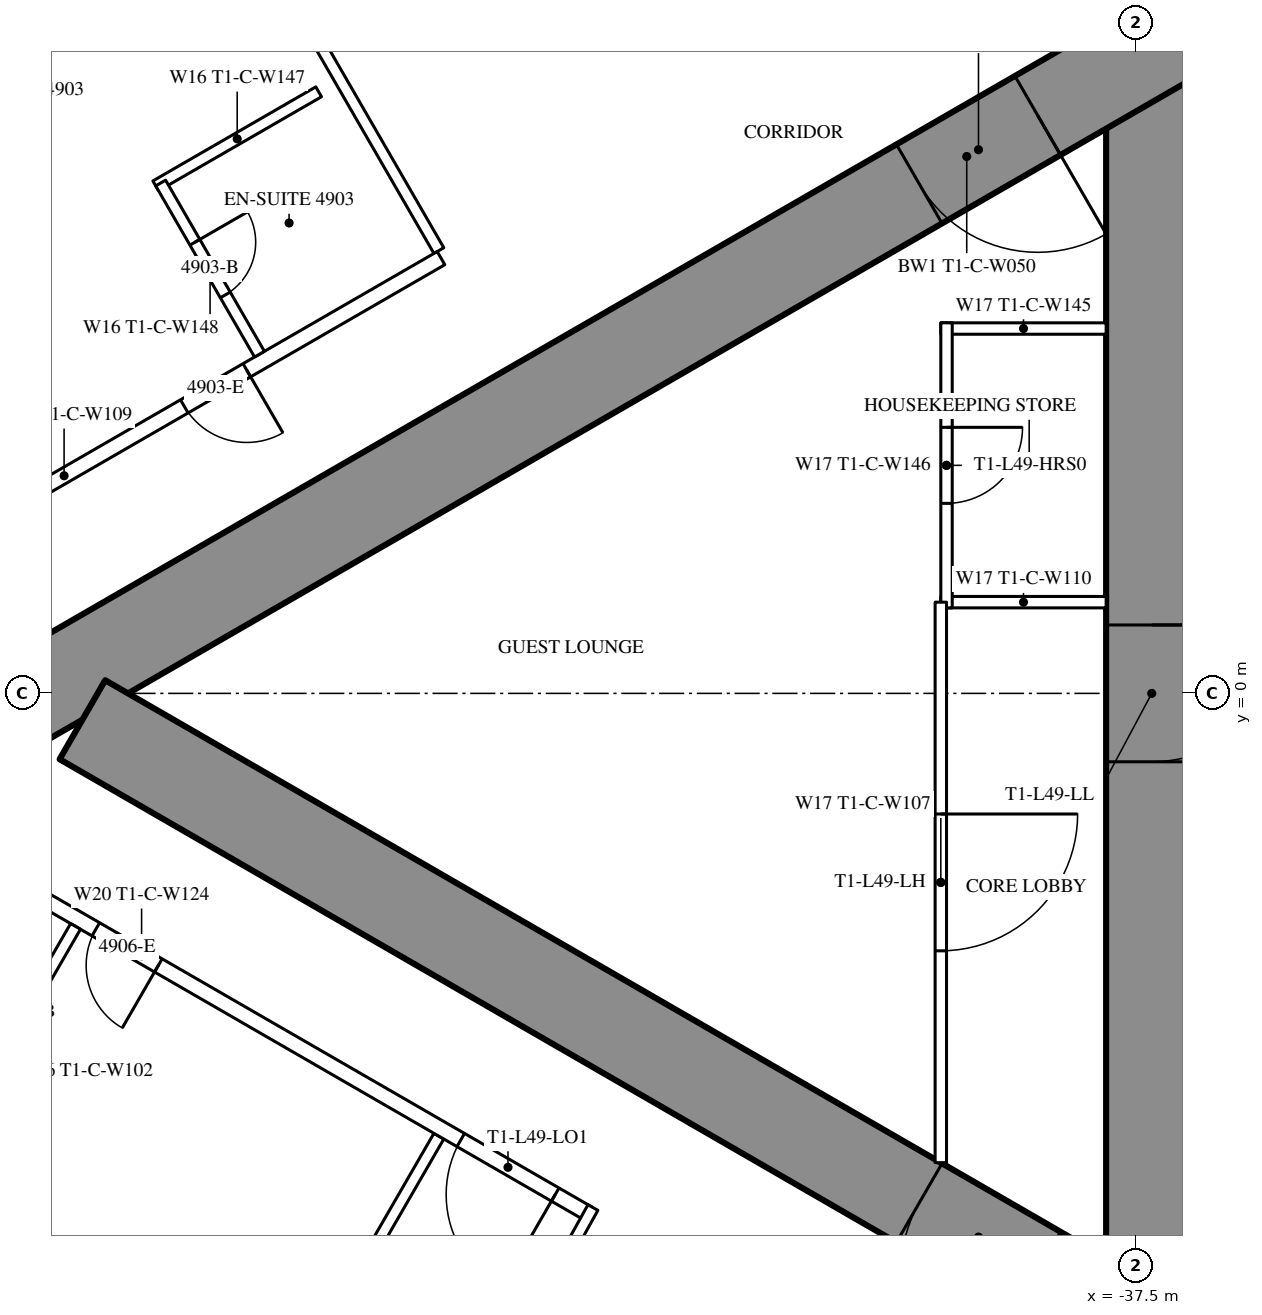
"""IFC4 building model, lengths in metres.
Left out: names, types, materials, properties, quantities, classifications, styles, units other than length and angle.
Written with IfcOpenShell. Run it as: python <this file> out.ifc"""

import sys

from ifc_helpers import new_model, si_unit, direction, frame, frame_2d, origin, place, context, subcontext, project, spatial, rectangle, extrude, element, fill, save


model = new_model("IFC4")
c1 = context("Model", 3, precision=1e-05, world=origin(), true_north=direction((0.0, 1.0)))
c2 = subcontext(c1, "Body", "Model", "MODEL_VIEW")
j1 = project(units=[si_unit("LENGTHUNIT", "METRE"), si_unit("PLANEANGLEUNIT", "RADIAN")], contexts=[c1])
p1 = place(None, origin())
s1 = spatial("IfcSite", under=j1, at=p1, CompositionType="ELEMENT")
p2 = place(p1, origin())
s2 = spatial("IfcBuilding", under=s1, at=p2, CompositionType="ELEMENT")
p3 = place(p2, frame((0.0, 0.0, 184.3)))
s3 = spatial("IfcBuildingStorey", under=s2, at=p3, CompositionType="ELEMENT", Elevation=184.3)
p4 = place(p3, frame((-37.3, 8.6, 0.0), z_axis=(0.0, 0.0, 1.0), x_axis=(0.0, -1.0, 0.0)))
e1 = element("IfcWall", 1, at=p4, inside=s3, PredefinedType="SHEAR", context=c2, shape_type="SweptSolid", body=[
    extrude(rectangle(XDim=17.2, YDim=1.2, at=frame_2d((8.6, 0.0))), origin(), (0.0, 0.0, 1.0), 3.5),
])
p5 = place(p4, frame((7.7, 0.0, 0.0)))
e2 = element("IfcOpeningElement", 2, at=p5, cuts=e1, PredefinedType="OPENING", context=c2, shape_type="SweptSolid", body=[
    extrude(rectangle(XDim=1.8, YDim=2.2, at=frame_2d((0.9, 1.1))), frame((0.0, 0.61, 0.0), z_axis=(0.0, -1.0, 0.0), x_axis=(1.0, 0.0, 0.0)), (0.0, 0.0, 1.0), 1.22),
])
p6 = place(p3, frame((-27.2, 14.3, 0.0), z_axis=(0.0, 0.0, 1.0), x_axis=(-0.866026593062, -0.499997940104, 0.0)))
e3 = element("IfcWall", 3, at=p6, inside=s3, PredefinedType="SHEAR", context=c2, shape_type="SweptSolid", body=[
    extrude(rectangle(XDim=28.946, YDim=1.2, at=frame_2d((14.473, 0.0))), origin(), (0.0, 0.0, 1.0), 3.5),
])
p7 = place(p6, frame((4.6, 0.0, 0.0)))
e4 = element("IfcOpeningElement", 4, at=p7, cuts=e3, PredefinedType="OPENING", context=c2, shape_type="SweptSolid", body=[
    extrude(rectangle(XDim=1.0, YDim=2.2, at=frame_2d((0.5, 1.1))), frame((0.0, 0.61, 0.0), z_axis=(0.0, -1.0, 0.0), x_axis=(1.0, 0.0, 0.0)), (0.0, 0.0, 1.0), 1.22),
])
p8 = place(p6, frame((13.395, 0.0, 0.0)))
e5 = element("IfcOpeningElement", 5, at=p8, cuts=e3, PredefinedType="OPENING", context=c2, shape_type="SweptSolid", body=[
    extrude(rectangle(XDim=1.8, YDim=2.2, at=frame_2d((0.9, 1.1))), frame((0.0, 0.61, 0.0), z_axis=(0.0, -1.0, 0.0), x_axis=(1.0, 0.0, 0.0)), (0.0, 0.0, 1.0), 1.22),
])
p9 = place(p3, frame((-27.2, -14.3, 0.0), z_axis=(0.0, 0.0, 1.0), x_axis=(-0.866024021859, 0.500002393557, 0.0)))
e6 = element("IfcWall", 6, at=p9, inside=s3, PredefinedType="SHEAR", context=c2, shape_type="SweptSolid", body=[
    extrude(rectangle(XDim=27.907, YDim=1.2, at=frame_2d((13.954, 0.0))), origin(), (0.0, 0.0, 1.0), 3.5),
])
p10 = place(p9, frame((4.6, 0.0, 0.0)))
e7 = element("IfcOpeningElement", 7, at=p10, cuts=e6, PredefinedType="OPENING", context=c2, shape_type="SweptSolid", body=[
    extrude(rectangle(XDim=1.0, YDim=2.2, at=frame_2d((0.5, 1.1))), frame((0.0, 0.61, 0.0), z_axis=(0.0, -1.0, 0.0), x_axis=(1.0, 0.0, 0.0)), (0.0, 0.0, 1.0), 1.22),
])
p11 = place(p9, frame((13.395, 0.0, 0.0)))
e8 = element("IfcOpeningElement", 8, at=p11, cuts=e6, PredefinedType="OPENING", context=c2, shape_type="SweptSolid", body=[
    extrude(rectangle(XDim=1.8, YDim=2.2, at=frame_2d((0.9, 1.1))), frame((0.0, 0.61, 0.0), z_axis=(0.0, -1.0, 0.0), x_axis=(1.0, 0.0, 0.0)), (0.0, 0.0, 1.0), 1.22),
])
for number, where, z_axis, x_axis in (
    (9, (-46.679, 5.825, 0.0), (0.0, 0.0, 1.0), (-0.5, 0.866, 0.0)),
    (10, (-46.679, -5.825, 0.0), (0.0, 0.0, 1.0), (-0.5, -0.866, 0.0)),
):
    element("IfcWall", number, at=place(p3, frame(where, z_axis=z_axis, x_axis=x_axis)), inside=s3, PredefinedType="PARTITIONING", context=c2, shape_type="SweptSolid", body=[
        extrude(rectangle(XDim=6.911, YDim=0.15, at=frame_2d((3.456, 0.0))), origin(), (0.0, 0.0, 1.0), 2.3),
    ])
p12 = place(p3, frame((-44.715, -6.844, 0.0), z_axis=(0.0, 0.0, 1.0), x_axis=(-0.866025261224, 0.500000246922, 0.0)))
e11 = element("IfcWall", 11, at=p12, inside=s3, PredefinedType="PARTITIONING", context=c2, shape_type="SweptSolid", body=[
    extrude(rectangle(XDim=13.567, YDim=0.2, at=frame_2d((6.783, 0.0))), origin(), (0.0, 0.0, 1.0), 3.25),
])
p13 = place(p12, frame((10.579, 0.0, 0.0)))
e12 = element("IfcOpeningElement", 12, at=p13, cuts=e11, PredefinedType="OPENING", context=c2, shape_type="SweptSolid", body=[
    extrude(rectangle(XDim=0.95, YDim=2.2, at=frame_2d((0.475, 1.1))), frame((0.0, 0.11, 0.0), z_axis=(0.0, -1.0, 0.0), x_axis=(1.0, 0.0, 0.0)), (0.0, 0.0, 1.0), 0.22),
])
p14 = place(p12, frame((6.529, 0.0, 0.0)))
e13 = element("IfcOpeningElement", 13, at=p14, cuts=e11, PredefinedType="OPENING", context=c2, shape_type="SweptSolid", body=[
    extrude(rectangle(XDim=0.95, YDim=2.2, at=frame_2d((0.475, 1.1))), frame((0.0, 0.11, 0.0), z_axis=(0.0, -1.0, 0.0), x_axis=(1.0, 0.0, 0.0)), (0.0, 0.0, 1.0), 0.22),
])
p15 = place(p12, frame((0.5, 0.0, 0.0)))
e14 = element("IfcOpeningElement", 14, at=p15, cuts=e11, PredefinedType="OPENING", context=c2, shape_type="SweptSolid", body=[
    extrude(rectangle(XDim=1.435, YDim=2.2, at=frame_2d((0.718, 1.1))), frame((0.0, 0.11, 0.0), z_axis=(0.0, -1.0, 0.0), x_axis=(1.0, 0.0, 0.0)), (0.0, 0.0, 1.0), 0.22),
])
p16 = place(p3, frame((-44.652, -6.764, 0.0), z_axis=(0.0, 0.0, 1.0), x_axis=(-0.485424724123, -0.874278466629, 0.0)))
e15 = element("IfcWall", 15, at=p16, inside=s3, PredefinedType="PARTITIONING", context=c2, shape_type="SweptSolid", body=[
    extrude(rectangle(XDim=1.805, YDim=0.15, at=frame_2d((0.903, 0.0))), origin(), (0.0, 0.0, 1.0), 3.25),
])
p17 = place(p3, frame((-46.65, 5.726, 0.0), z_axis=(0.0, 0.0, 1.0), x_axis=(-0.866027963864, -0.499995565786, 0.0)))
e16 = element("IfcWall", 16, at=p17, inside=s3, PredefinedType="PARTITIONING", context=c2, shape_type="SweptSolid", body=[
    extrude(rectangle(XDim=11.452, YDim=0.2, at=frame_2d((5.726, 0.0))), origin(), (0.0, 0.0, 1.0), 3.25),
])
p18 = place(p17, frame((2.95, 0.0, 0.0)))
e17 = element("IfcOpeningElement", 17, at=p18, cuts=e16, PredefinedType="OPENING", context=c2, shape_type="SweptSolid", body=[
    extrude(rectangle(XDim=0.95, YDim=2.2, at=frame_2d((0.475, 1.1))), frame((0.0, 0.11, 0.0), z_axis=(0.0, -1.0, 0.0), x_axis=(1.0, 0.0, 0.0)), (0.0, 0.0, 1.0), 0.22),
])
p19 = place(p17, frame((8.344, 0.0, 0.0)))
e18 = element("IfcOpeningElement", 18, at=p19, cuts=e16, PredefinedType="OPENING", context=c2, shape_type="SweptSolid", body=[
    extrude(rectangle(XDim=0.95, YDim=2.2, at=frame_2d((0.475, 1.1))), frame((0.0, 0.11, 0.0), z_axis=(0.0, -1.0, 0.0), x_axis=(1.0, 0.0, 0.0)), (0.0, 0.0, 1.0), 0.22),
])
p20 = place(p3, frame((-48.26, 7.914, 0.0), z_axis=(0.0, 0.0, 1.0), x_axis=(-0.866031185235, -0.4999899861, 0.0)))
e19 = element("IfcWall", 19, at=p20, inside=s3, PredefinedType="PARTITIONING", context=c2, shape_type="SweptSolid", body=[
    extrude(rectangle(XDim=2.475, YDim=0.15, at=frame_2d((1.238, 0.0))), origin(), (0.0, 0.0, 1.0), 3.25),
])
p21 = place(p3, frame((-49.039, 4.463, 0.0), z_axis=(0.0, 0.0, 1.0), x_axis=(-0.499936506574, 0.866062058628, 0.0)))
e20 = element("IfcWall", 20, at=p21, inside=s3, PredefinedType="PARTITIONING", context=c2, shape_type="SweptSolid", body=[
    extrude(rectangle(XDim=2.6, YDim=0.15, at=frame_2d((1.3, 0.0))), origin(), (0.0, 0.0, 1.0), 3.25),
])
p22 = place(p21, frame((0.9, 0.0, 0.0)))
e21 = element("IfcOpeningElement", 21, at=p22, cuts=e20, PredefinedType="OPENING", context=c2, shape_type="SweptSolid", body=[
    extrude(rectangle(XDim=0.8, YDim=2.2, at=frame_2d((0.4, 1.1))), frame((0.0, 0.085, 0.0), z_axis=(0.0, -1.0, 0.0), x_axis=(1.0, 0.0, 0.0)), (0.0, 0.0, 1.0), 0.17),
])
p23 = place(p3, frame((-51.459, -3.065, 0.0), z_axis=(0.0, 0.0, 1.0), x_axis=(-0.499936506574, -0.866062058628, 0.0)))
e22 = element("IfcWall", 22, at=p23, inside=s3, PredefinedType="PARTITIONING", context=c2, shape_type="SweptSolid", body=[
    extrude(rectangle(XDim=2.6, YDim=0.15, at=frame_2d((1.3, 0.0))), origin(), (0.0, 0.0, 1.0), 3.25),
])
p24 = place(p23, frame((0.9, 0.0, 0.0)))
e23 = element("IfcOpeningElement", 23, at=p24, cuts=e22, PredefinedType="OPENING", context=c2, shape_type="SweptSolid", body=[
    extrude(rectangle(XDim=0.8, YDim=2.2, at=frame_2d((0.4, 1.1))), frame((0.0, 0.085, 0.0), z_axis=(0.0, -1.0, 0.0), x_axis=(1.0, 0.0, 0.0)), (0.0, 0.0, 1.0), 0.17),
])
for number, where, z_axis, x_axis in (
    (24, (-37.9, 1.2, 0.0), (0.0, 0.0, 1.0), (-1.0, 0.0, 0.0)),
    (25, (-37.9, 4.8, 0.0), (0.0, 0.0, 1.0), (-1.0, 0.0, 0.0)),
):
    element("IfcWall", number, at=place(p3, frame(where, z_axis=z_axis, x_axis=x_axis)), inside=s3, PredefinedType="PARTITIONING", context=c2, shape_type="SweptSolid", body=[
        extrude(rectangle(XDim=2.175, YDim=0.15, at=frame_2d((1.087, 0.0))), origin(), (0.0, 0.0, 1.0), 3.25),
    ])
p25 = place(p3, frame((-40.0, 4.875, 0.0), z_axis=(0.0, 0.0, 1.0), x_axis=(0.0, -1.0, 0.0)))
e26 = element("IfcWall", 26, at=p25, inside=s3, PredefinedType="PARTITIONING", context=c2, shape_type="SweptSolid", body=[
    extrude(rectangle(XDim=3.75, YDim=0.15, at=frame_2d((1.875, 0.0))), origin(), (0.0, 0.0, 1.0), 3.25),
])
p26 = place(p25, frame((1.375, 0.0, 0.0)))
e27 = element("IfcOpeningElement", 27, at=p26, cuts=e26, PredefinedType="OPENING", context=c2, shape_type="SweptSolid", body=[
    extrude(rectangle(XDim=1.0, YDim=2.2, at=frame_2d((0.5, 1.1))), frame((0.0, 0.085, 0.0), z_axis=(0.0, -1.0, 0.0), x_axis=(1.0, 0.0, 0.0)), (0.0, 0.0, 1.0), 0.17),
])
p27 = place(p3, frame((-40.075, 1.2, 0.0), z_axis=(0.0, 0.0, 1.0), x_axis=(0.0, -1.0, 0.0)))
e28 = element("IfcWall", 28, at=p27, inside=s3, PredefinedType="PARTITIONING", context=c2, shape_type="SweptSolid", body=[
    extrude(rectangle(XDim=7.374, YDim=0.15, at=frame_2d((3.687, 0.0))), origin(), (0.0, 0.0, 1.0), 3.25),
])
p28 = place(p27, frame((2.787, 0.0, 0.0)))
e29 = element("IfcOpeningElement", 29, at=p28, cuts=e28, PredefinedType="OPENING", context=c2, shape_type="SweptSolid", body=[
    extrude(rectangle(XDim=1.8, YDim=2.2, at=frame_2d((0.9, 1.1))), frame((0.0, 0.085, 0.0), z_axis=(0.0, -1.0, 0.0), x_axis=(1.0, 0.0, 0.0)), (0.0, 0.0, 1.0), 0.17),
])
p29 = place(p22, origin())
e30 = element("IfcDoor", 30, at=p29, inside=s3, OperationType="SINGLE_SWING_RIGHT", PredefinedType="DOOR", context=c2, shape_type="SweptSolid", body=[
    extrude(rectangle(XDim=0.8, YDim=2.2, at=frame_2d((0.4, 1.1))), frame((0.0, 0.025, 0.0), z_axis=(0.0, -1.0, 0.0), x_axis=(1.0, 0.0, 0.0)), (0.0, 0.0, 1.0), 0.05),
])
fill(e21, e30)
p30 = place(p18, origin())
e31 = element("IfcDoor", 31, at=p30, inside=s3, OperationType="SINGLE_SWING_LEFT", PredefinedType="DOOR", context=c2, shape_type="SweptSolid", body=[
    extrude(rectangle(XDim=0.95, YDim=2.2, at=frame_2d((0.475, 1.1))), frame((0.0, 0.025, 0.0), z_axis=(0.0, -1.0, 0.0), x_axis=(1.0, 0.0, 0.0)), (0.0, 0.0, 1.0), 0.05),
])
fill(e17, e31)
p31 = place(p14, origin())
e32 = element("IfcDoor", 32, at=p31, inside=s3, OperationType="SINGLE_SWING_LEFT", PredefinedType="DOOR", context=c2, shape_type="SweptSolid", body=[
    extrude(rectangle(XDim=0.95, YDim=2.2, at=frame_2d((0.475, 1.1))), frame((0.0, 0.025, 0.0), z_axis=(0.0, -1.0, 0.0), x_axis=(1.0, 0.0, 0.0)), (0.0, 0.0, 1.0), 0.05),
])
fill(e13, e32)
p32 = place(p15, origin())
e33 = element("IfcDoor", 33, at=p32, inside=s3, OperationType="SINGLE_SWING_LEFT", PredefinedType="DOOR", context=c2, shape_type="SweptSolid", body=[
    extrude(rectangle(XDim=1.435, YDim=2.2, at=frame_2d((0.718, 1.1))), frame((0.0, 0.025, 0.0), z_axis=(0.0, -1.0, 0.0), x_axis=(1.0, 0.0, 0.0)), (0.0, 0.0, 1.0), 0.05),
])
fill(e14, e33)
p33 = place(p26, origin())
e34 = element("IfcDoor", 34, at=p33, inside=s3, OperationType="SINGLE_SWING_LEFT", PredefinedType="DOOR", context=c2, shape_type="SweptSolid", body=[
    extrude(rectangle(XDim=1.0, YDim=2.2, at=frame_2d((0.5, 1.1))), frame((0.0, 0.025, 0.0), z_axis=(0.0, -1.0, 0.0), x_axis=(1.0, 0.0, 0.0)), (0.0, 0.0, 1.0), 0.05),
])
fill(e27, e34)
p34 = place(p28, origin())
e35 = element("IfcDoor", 35, at=p34, inside=s3, OperationType="DOUBLE_DOOR_SINGLE_SWING", PredefinedType="DOOR", context=c2, shape_type="SweptSolid", body=[
    extrude(rectangle(XDim=1.8, YDim=2.2, at=frame_2d((0.9, 1.1))), frame((0.0, 0.025, 0.0), z_axis=(0.0, -1.0, 0.0), x_axis=(1.0, 0.0, 0.0)), (0.0, 0.0, 1.0), 0.05),
])
fill(e29, e35)
p35 = place(p8, origin())
e36 = element("IfcDoor", 36, at=p35, inside=s3, OperationType="DOUBLE_DOOR_SINGLE_SWING", PredefinedType="DOOR", context=c2, shape_type="SweptSolid", body=[
    extrude(rectangle(XDim=1.8, YDim=2.2, at=frame_2d((0.9, 1.1))), frame((0.0, 0.025, 0.0), z_axis=(0.0, -1.0, 0.0), x_axis=(1.0, 0.0, 0.0)), (0.0, 0.0, 1.0), 0.05),
])
fill(e5, e36)
p36 = place(p11, origin())
e37 = element("IfcDoor", 37, at=p36, inside=s3, OperationType="DOUBLE_DOOR_SINGLE_SWING", PredefinedType="DOOR", context=c2, shape_type="SweptSolid", body=[
    extrude(rectangle(XDim=1.8, YDim=2.2, at=frame_2d((0.9, 1.1))), frame((0.0, 0.025, 0.0), z_axis=(0.0, -1.0, 0.0), x_axis=(1.0, 0.0, 0.0)), (0.0, 0.0, 1.0), 0.05),
])
fill(e8, e37)
p37 = place(p5, origin())
e38 = element("IfcDoor", 38, at=p37, inside=s3, OperationType="DOUBLE_DOOR_SINGLE_SWING", PredefinedType="DOOR", context=c2, shape_type="SweptSolid", body=[
    extrude(rectangle(XDim=1.8, YDim=2.2, at=frame_2d((0.9, 1.1))), frame((0.0, 0.025, 0.0), z_axis=(0.0, -1.0, 0.0), x_axis=(1.0, 0.0, 0.0)), (0.0, 0.0, 1.0), 0.05),
])
fill(e2, e38)
save(model, sys.argv[1])
